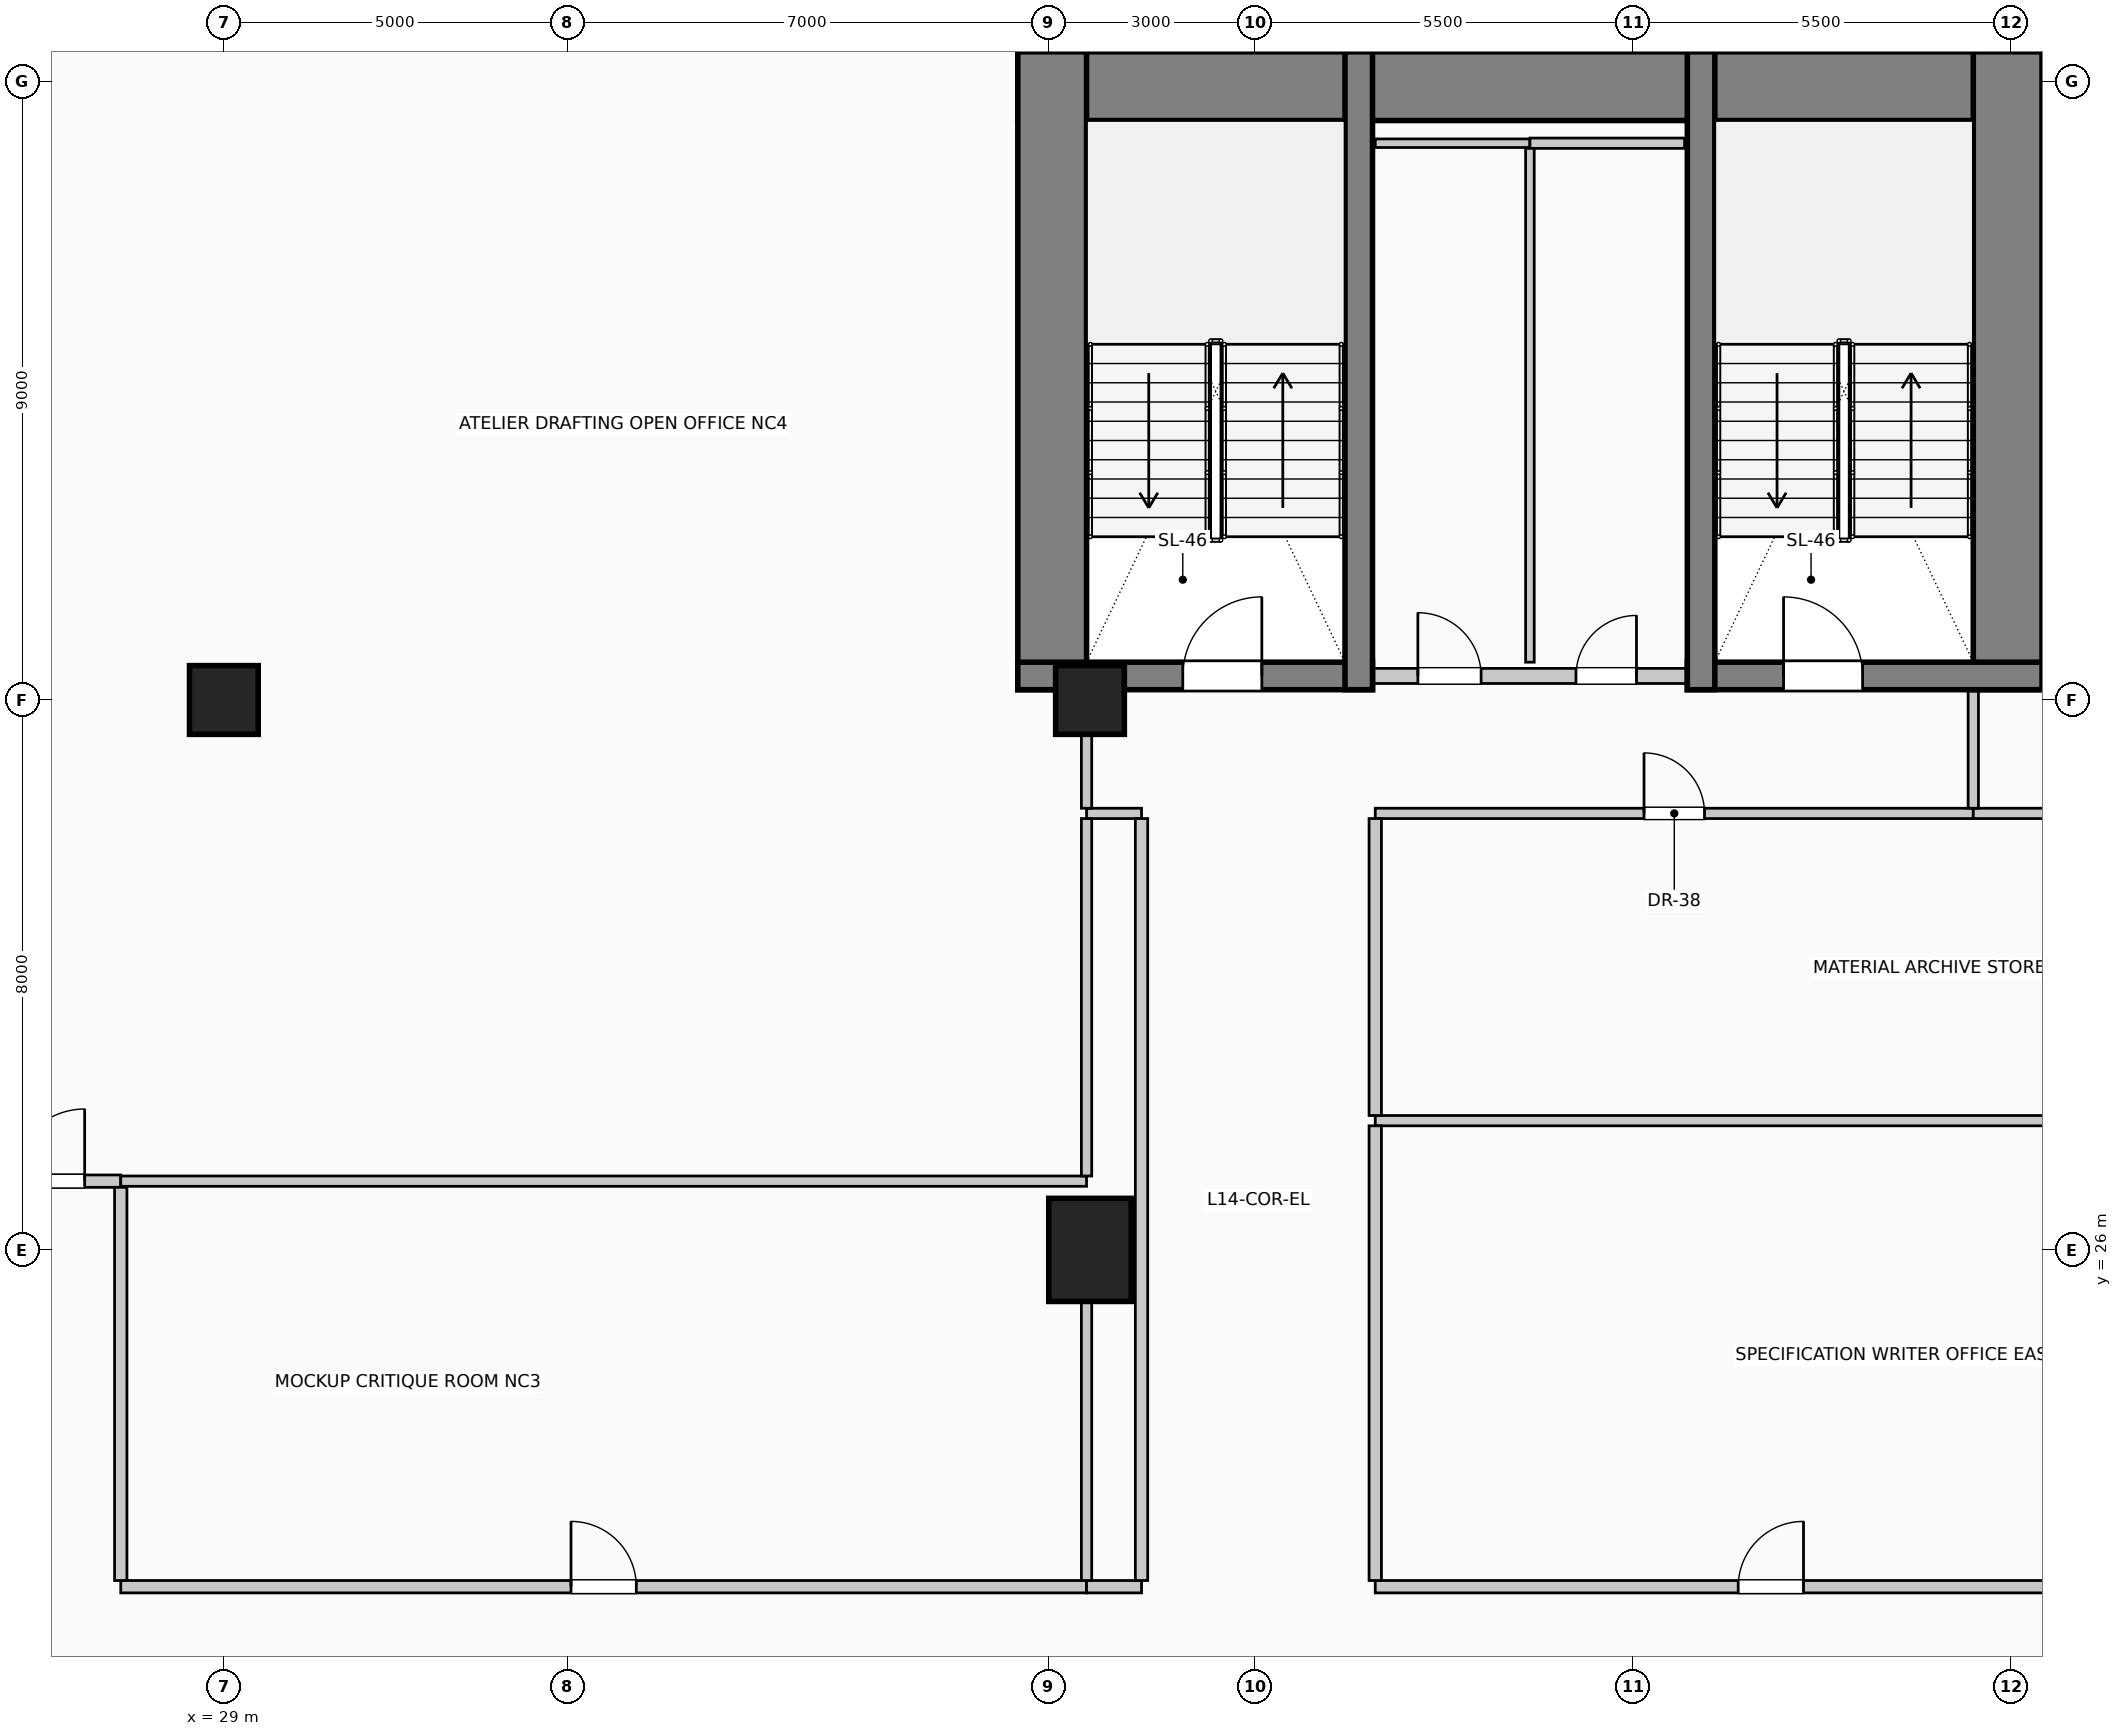
"""IFC4 building model, lengths in metres.
Left out: names, types, materials, properties, quantities, classifications, styles, units other than length and angle.
Written with IfcOpenShell. Run it as: python <this file> out.ifc"""

import sys

from ifc_helpers import new_model, si_unit, direction, frame, frame_2d, origin, origin_2d, place, context, subcontext, project, spatial, rectangle, circle, extrude, element, fill, save


model = new_model("IFC4")
c1 = context("Model", 3, precision=1e-05, world=origin(), true_north=direction((0.0, 1.0)))
c2 = subcontext(c1, "Body", "Model", "MODEL_VIEW")
j1 = project(units=[si_unit("LENGTHUNIT", "METRE"), si_unit("PLANEANGLEUNIT", "RADIAN")], contexts=[c1])
p1 = place(None, origin())
s1 = spatial("IfcSite", under=j1, at=p1, CompositionType="ELEMENT")
p2 = place(p1, origin())
s2 = spatial("IfcBuilding", under=s1, at=p2, CompositionType="ELEMENT")
p3 = place(p2, frame((0.0, 0.0, 58.6)))
s3 = spatial("IfcBuildingStorey", under=s2, at=p3, CompositionType="ELEMENT", Elevation=58.6)
p4 = place(p3, frame((40.55, 42.93, 0.0), z_axis=(0.0, 0.0, 1.0), x_axis=(1.0, 0.0, 0.0)))
e1 = element("IfcWall", 1, at=p4, inside=s3, PredefinedType="SHEAR", context=c2, shape_type="SweptSolid", body=[
    extrude(rectangle(XDim=14.9, YDim=1.0, at=frame_2d((7.45, 0.0))), origin(), (0.0, 0.0, 1.0), 4.0),
])
for number, where, z_axis, x_axis in (
    (2, (41.05, 34.15, 0.0), (0.0, 0.0, 1.0), (0.0, 1.0, 0.0)),
    (3, (54.95, 34.15, 0.0), (0.0, 0.0, 1.0), (0.0, 1.0, 0.0)),
):
    element("IfcWall", number, at=place(p3, frame(where, z_axis=z_axis, x_axis=x_axis)), inside=s3, PredefinedType="SHEAR", context=c2, shape_type="SweptSolid", body=[
        extrude(rectangle(XDim=9.28, YDim=1.0, at=frame_2d((4.64, 0.0))), origin(), (0.0, 0.0, 1.0), 4.0),
    ])
p5 = place(p3, frame((40.55, 34.35, 0.0), z_axis=(0.0, 0.0, 1.0), x_axis=(1.0, 0.0, 0.0)))
e4 = element("IfcWall", 4, at=p5, inside=s3, PredefinedType="SHEAR", context=c2, shape_type="SweptSolid", body=[
    extrude(rectangle(XDim=5.16, YDim=0.4, at=frame_2d((2.58, 0.0))), origin(), (0.0, 0.0, 1.0), 4.0),
])
p6 = place(p5, frame((2.4, 0.0, 0.0)))
e5 = element("IfcOpeningElement", 5, at=p6, cuts=e4, PredefinedType="OPENING", context=c2, shape_type="SweptSolid", body=[
    extrude(rectangle(XDim=1.15, YDim=2.2, at=frame_2d((0.575, 1.1))), frame((0.0, 0.21, 0.0), z_axis=(0.0, -1.0, 0.0), x_axis=(1.0, 0.0, 0.0)), (0.0, 0.0, 1.0), 0.42),
])
p7 = place(p3, frame((45.51, 34.15, 0.0), z_axis=(0.0, 0.0, 1.0), x_axis=(0.0, 1.0, 0.0)))
e6 = element("IfcWall", 6, at=p7, inside=s3, PredefinedType="SHEAR", context=c2, shape_type="SweptSolid", body=[
    extrude(rectangle(XDim=9.28, YDim=0.4, at=frame_2d((4.64, 0.0))), origin(), (0.0, 0.0, 1.0), 4.0),
])
p8 = place(p3, frame((50.29, 34.35, 0.0), z_axis=(0.0, 0.0, 1.0), x_axis=(1.0, 0.0, 0.0)))
e7 = element("IfcWall", 7, at=p8, inside=s3, PredefinedType="SHEAR", context=c2, shape_type="SweptSolid", body=[
    extrude(rectangle(XDim=5.16, YDim=0.4, at=frame_2d((2.58, 0.0))), origin(), (0.0, 0.0, 1.0), 4.0),
])
p9 = place(p8, frame((1.4, 0.0, 0.0)))
e8 = element("IfcOpeningElement", 8, at=p9, cuts=e7, PredefinedType="OPENING", context=c2, shape_type="SweptSolid", body=[
    extrude(rectangle(XDim=1.15, YDim=2.2, at=frame_2d((0.575, 1.1))), frame((0.0, 0.21, 0.0), z_axis=(0.0, -1.0, 0.0), x_axis=(1.0, 0.0, 0.0)), (0.0, 0.0, 1.0), 0.42),
])
p10 = place(p3, frame((50.49, 34.15, 0.0), z_axis=(0.0, 0.0, 1.0), x_axis=(0.0, 1.0, 0.0)))
e9 = element("IfcWall", 9, at=p10, inside=s3, PredefinedType="SHEAR", context=c2, shape_type="SweptSolid", body=[
    extrude(rectangle(XDim=9.28, YDim=0.4, at=frame_2d((4.64, 0.0))), origin(), (0.0, 0.0, 1.0), 4.0),
])
p11 = place(p3, frame((41.6, 26.0, 0.0), z_axis=(0.0, 0.0, 1.0), x_axis=(1.0, 0.0, 0.0)))
e10 = element("IfcColumn", 10, at=p11, inside=s3, PredefinedType="COLUMN", context=c2, shape_type="SweptSolid", body=[
    extrude(rectangle(XDim=1.2, YDim=1.5, at=origin_2d()), origin(), (0.0, 0.0, 1.0), 4.0),
])
for number, where, z_axis, x_axis in (
    (11, (29.0, 34.0, 0.0), (0.0, 0.0, 1.0), (1.0, 0.0, 0.0)),
    (12, (41.6, 34.0, 0.0), (0.0, 0.0, 1.0), (1.0, 0.0, 0.0)),
):
    element("IfcColumn", number, at=place(p3, frame(where, z_axis=z_axis, x_axis=x_axis)), inside=s3, PredefinedType="COLUMN", context=c2, shape_type="SweptSolid", body=[
        extrude(circle(Radius=0.5, at=origin_2d()), origin(), (0.0, 0.0, 1.0), 4.0),
    ])
p12 = place(p3, frame((45.72, 34.35, 0.0), z_axis=(0.0, 0.0, 1.0), x_axis=(1.0, 0.0, 0.0)))
e13 = element("IfcWall", 13, at=p12, inside=s3, PredefinedType="PARTITIONING", context=c2, shape_type="SweptSolid", body=[
    extrude(rectangle(XDim=4.56, YDim=0.22, at=frame_2d((2.28, 0.0))), origin(), (0.0, 0.0, 1.0), 3.7),
])
p13 = place(p12, frame((0.65, 0.0, 0.0)))
e14 = element("IfcOpeningElement", 14, at=p13, cuts=e13, PredefinedType="OPENING", context=c2, shape_type="SweptSolid", body=[
    extrude(rectangle(XDim=0.92, YDim=2.1, at=frame_2d((0.46, 1.05))), frame((0.0, 0.12, 0.0), z_axis=(0.0, -1.0, 0.0), x_axis=(1.0, 0.0, 0.0)), (0.0, 0.0, 1.0), 0.24),
])
p14 = place(p12, frame((2.95, 0.0, 0.0)))
e15 = element("IfcOpeningElement", 15, at=p14, cuts=e13, PredefinedType="OPENING", context=c2, shape_type="SweptSolid", body=[
    extrude(rectangle(XDim=0.88, YDim=2.1, at=frame_2d((0.44, 1.05))), frame((0.0, 0.12, 0.0), z_axis=(0.0, -1.0, 0.0), x_axis=(1.0, 0.0, 0.0)), (0.0, 0.0, 1.0), 0.24),
])
p15 = place(p3, frame((27.5, 21.1, 0.0), z_axis=(0.0, 0.0, 1.0), x_axis=(1.0, 0.0, 0.0)))
e16 = element("IfcWall", 16, at=p15, inside=s3, PredefinedType="PARTITIONING", context=c2, shape_type="SweptSolid", body=[
    extrude(rectangle(XDim=14.05, YDim=0.18, at=frame_2d((7.025, 0.0))), origin(), (0.0, 0.0, 1.0), 3.7),
])
p16 = place(p15, frame((6.55, 0.0, 0.0)))
e17 = element("IfcOpeningElement", 17, at=p16, cuts=e16, PredefinedType="OPENING", context=c2, shape_type="SweptSolid", body=[
    extrude(rectangle(XDim=0.95, YDim=2.15, at=frame_2d((0.475, 1.075))), frame((0.0, 0.1, 0.0), z_axis=(0.0, -1.0, 0.0), x_axis=(1.0, 0.0, 0.0)), (0.0, 0.0, 1.0), 0.2),
])
p17 = place(p3, frame((41.55, 21.1, 0.0), z_axis=(0.0, 0.0, 1.0), x_axis=(1.0, 0.0, 0.0)))
e18 = element("IfcWall", 18, at=p17, inside=s3, PredefinedType="PARTITIONING", context=c2, shape_type="SweptSolid", body=[
    extrude(rectangle(XDim=0.8, YDim=0.18, at=frame_2d((0.4, 0.0))), origin(), (0.0, 0.0, 1.0), 3.7),
])
p18 = place(p3, frame((45.75, 21.1, 0.0), z_axis=(0.0, 0.0, 1.0), x_axis=(1.0, 0.0, 0.0)))
e19 = element("IfcWall", 19, at=p18, inside=s3, PredefinedType="PARTITIONING", context=c2, shape_type="SweptSolid", body=[
    extrude(rectangle(XDim=11.51, YDim=0.18, at=frame_2d((5.755, 0.0))), origin(), (0.0, 0.0, 1.0), 3.7),
])
p19 = place(p18, frame((5.28, 0.0, 0.0)))
e20 = element("IfcOpeningElement", 20, at=p19, cuts=e19, PredefinedType="OPENING", context=c2, shape_type="SweptSolid", body=[
    extrude(rectangle(XDim=0.95, YDim=2.15, at=frame_2d((0.475, 1.075))), frame((0.0, 0.1, 0.0), z_axis=(0.0, -1.0, 0.0), x_axis=(1.0, 0.0, 0.0)), (0.0, 0.0, 1.0), 0.2),
])
p20 = place(p3, frame((25.4, 27.0, 0.0), z_axis=(0.0, 0.0, 1.0), x_axis=(1.0, 0.0, 0.0)))
e21 = element("IfcWall", 21, at=p20, inside=s3, PredefinedType="PARTITIONING", context=c2, shape_type="SweptSolid", body=[
    extrude(rectangle(XDim=2.1, YDim=0.18, at=frame_2d((1.05, 0.0))), origin(), (0.0, 0.0, 1.0), 3.7),
])
p21 = place(p20, frame((0.525, 0.0, 0.0)))
e22 = element("IfcOpeningElement", 22, at=p21, cuts=e21, PredefinedType="OPENING", context=c2, shape_type="SweptSolid", body=[
    extrude(rectangle(XDim=1.05, YDim=2.15, at=frame_2d((0.525, 1.075))), frame((0.0, 0.1, 0.0), z_axis=(0.0, -1.0, 0.0), x_axis=(1.0, 0.0, 0.0)), (0.0, 0.0, 1.0), 0.2),
])
p22 = place(p3, frame((27.5, 27.0, 0.0), z_axis=(0.0, 0.0, 1.0), x_axis=(1.0, 0.0, 0.0)))
e23 = element("IfcWall", 23, at=p22, inside=s3, PredefinedType="PARTITIONING", context=c2, shape_type="SweptSolid", body=[
    extrude(rectangle(XDim=14.05, YDim=0.15, at=frame_2d((7.025, 0.0))), origin(), (0.0, 0.0, 1.0), 3.7),
])
p23 = place(p3, frame((45.75, 27.88, 0.0), z_axis=(0.0, 0.0, 1.0), x_axis=(1.0, 0.0, 0.0)))
e24 = element("IfcWall", 24, at=p23, inside=s3, PredefinedType="PARTITIONING", context=c2, shape_type="SweptSolid", body=[
    extrude(rectangle(XDim=11.51, YDim=0.15, at=frame_2d((5.755, 0.0))), origin(), (0.0, 0.0, 1.0), 3.7),
])
p24 = place(p3, frame((41.55, 32.35, 0.0), z_axis=(0.0, 0.0, 1.0), x_axis=(1.0, 0.0, 0.0)))
e25 = element("IfcWall", 25, at=p24, inside=s3, PredefinedType="PARTITIONING", context=c2, shape_type="SweptSolid", body=[
    extrude(rectangle(XDim=0.8, YDim=0.15, at=frame_2d((0.4, 0.0))), origin(), (0.0, 0.0, 1.0), 3.7),
])
p25 = place(p3, frame((45.75, 32.35, 0.0), z_axis=(0.0, 0.0, 1.0), x_axis=(1.0, 0.0, 0.0)))
e26 = element("IfcWall", 26, at=p25, inside=s3, PredefinedType="PARTITIONING", context=c2, shape_type="SweptSolid", body=[
    extrude(rectangle(XDim=8.7, YDim=0.15, at=frame_2d((4.35, 0.0))), origin(), (0.0, 0.0, 1.0), 3.7),
])
p26 = place(p25, frame((3.91, 0.0, 0.0)))
e27 = element("IfcOpeningElement", 27, at=p26, cuts=e26, PredefinedType="OPENING", context=c2, shape_type="SweptSolid", body=[
    extrude(rectangle(XDim=0.88, YDim=2.1, at=frame_2d((0.44, 1.05))), frame((0.0, 0.085, 0.0), z_axis=(0.0, -1.0, 0.0), x_axis=(1.0, 0.0, 0.0)), (0.0, 0.0, 1.0), 0.17),
])
p27 = place(p3, frame((54.45, 32.35, 0.0), z_axis=(0.0, 0.0, 1.0), x_axis=(1.0, 0.0, 0.0)))
e28 = element("IfcWall", 28, at=p27, inside=s3, PredefinedType="PARTITIONING", context=c2, shape_type="SweptSolid", body=[
    extrude(rectangle(XDim=2.81, YDim=0.15, at=frame_2d((1.405, 0.0))), origin(), (0.0, 0.0, 1.0), 3.7),
])
p28 = place(p3, frame((45.75, 42.1, 0.0), z_axis=(0.0, 0.0, 1.0), x_axis=(1.0, 0.0, 0.0)))
e29 = element("IfcWall", 29, at=p28, inside=s3, PredefinedType="PARTITIONING", context=c2, shape_type="SweptSolid", body=[
    extrude(rectangle(XDim=2.25, YDim=0.125, at=frame_2d((1.125, 0.0))), origin(), (0.0, 0.0, 1.0), 3.7),
])
p29 = place(p3, frame((48.0, 42.1, 0.0), z_axis=(0.0, 0.0, 1.0), x_axis=(1.0, 0.0, 0.0)))
e30 = element("IfcWall", 30, at=p29, inside=s3, PredefinedType="PARTITIONING", context=c2, shape_type="SweptSolid", body=[
    extrude(rectangle(XDim=2.25, YDim=0.15, at=frame_2d((1.125, 0.0))), origin(), (0.0, 0.0, 1.0), 3.7),
])
p30 = place(p3, frame((27.5, 21.19, 0.0), z_axis=(0.0, 0.0, 1.0), x_axis=(0.0, 1.0, 0.0)))
e31 = element("IfcWall", 31, at=p30, inside=s3, PredefinedType="PARTITIONING", context=c2, shape_type="SweptSolid", body=[
    extrude(rectangle(XDim=5.72, YDim=0.18, at=frame_2d((2.86, 0.0))), origin(), (0.0, 0.0, 1.0), 3.7),
])
p31 = place(p3, frame((41.55, 21.19, 0.0), z_axis=(0.0, 0.0, 1.0), x_axis=(0.0, 1.0, 0.0)))
e32 = element("IfcWall", 32, at=p31, inside=s3, PredefinedType="PARTITIONING", context=c2, shape_type="SweptSolid", body=[
    extrude(rectangle(XDim=4.06, YDim=0.15, at=frame_2d((2.03, 0.0))), origin(), (0.0, 0.0, 1.0), 2.995),
])
p32 = place(p3, frame((41.55, 27.075, 0.0), z_axis=(0.0, 0.0, 1.0), x_axis=(0.0, 1.0, 0.0)))
e33 = element("IfcWall", 33, at=p32, inside=s3, PredefinedType="PARTITIONING", context=c2, shape_type="SweptSolid", body=[
    extrude(rectangle(XDim=5.2, YDim=0.15, at=frame_2d((2.6, 0.0))), origin(), (0.0, 0.0, 1.0), 2.995),
])
p33 = place(p3, frame((41.55, 32.425, 0.0), z_axis=(0.0, 0.0, 1.0), x_axis=(0.0, 1.0, 0.0)))
e34 = element("IfcWall", 34, at=p33, inside=s3, PredefinedType="PARTITIONING", context=c2, shape_type="SweptSolid", body=[
    extrude(rectangle(XDim=1.075, YDim=0.15, at=frame_2d((0.538, 0.0))), origin(), (0.0, 0.0, 1.0), 2.995),
])
p34 = place(p3, frame((41.55, 43.43, 0.0), z_axis=(0.0, 0.0, 1.0), x_axis=(0.0, 1.0, 0.0)))
e35 = element("IfcWall", 35, at=p34, inside=s3, PredefinedType="PARTITIONING", context=c2, shape_type="SweptSolid", body=[
    extrude(rectangle(XDim=1.22, YDim=0.15, at=frame_2d((0.61, 0.0))), origin(), (0.0, 0.0, 1.0), 3.7),
])
p35 = place(p3, frame((42.35, 21.19, 0.0), z_axis=(0.0, 0.0, 1.0), x_axis=(0.0, 1.0, 0.0)))
e36 = element("IfcWall", 36, at=p35, inside=s3, PredefinedType="PARTITIONING", context=c2, shape_type="SweptSolid", body=[
    extrude(rectangle(XDim=11.085, YDim=0.18, at=frame_2d((5.542, 0.0))), origin(), (0.0, 0.0, 1.0), 3.7),
])
p36 = place(p3, frame((45.75, 21.19, 0.0), z_axis=(0.0, 0.0, 1.0), x_axis=(0.0, 1.0, 0.0)))
e37 = element("IfcWall", 37, at=p36, inside=s3, PredefinedType="PARTITIONING", context=c2, shape_type="SweptSolid", body=[
    extrude(rectangle(XDim=6.615, YDim=0.18, at=frame_2d((3.308, 0.0))), origin(), (0.0, 0.0, 1.0), 3.7),
])
p37 = place(p3, frame((45.75, 27.955, 0.0), z_axis=(0.0, 0.0, 1.0), x_axis=(0.0, 1.0, 0.0)))
e38 = element("IfcWall", 38, at=p37, inside=s3, PredefinedType="PARTITIONING", context=c2, shape_type="SweptSolid", body=[
    extrude(rectangle(XDim=4.32, YDim=0.18, at=frame_2d((2.16, 0.0))), origin(), (0.0, 0.0, 1.0), 3.7),
])
p38 = place(p3, frame((48.0, 34.55, 0.0), z_axis=(0.0, 0.0, 1.0), x_axis=(0.0, 1.0, 0.0)))
e39 = element("IfcWall", 39, at=p38, inside=s3, PredefinedType="PARTITIONING", context=c2, shape_type="SweptSolid", body=[
    extrude(rectangle(XDim=7.475, YDim=0.125, at=frame_2d((3.737, 0.0))), origin(), (0.0, 0.0, 1.0), 3.7),
])
p39 = place(p3, frame((54.45, 32.425, 0.0), z_axis=(0.0, 0.0, 1.0), x_axis=(0.0, 1.0, 0.0)))
e40 = element("IfcWall", 40, at=p39, inside=s3, PredefinedType="PARTITIONING", context=c2, shape_type="SweptSolid", body=[
    extrude(rectangle(XDim=1.725, YDim=0.15, at=frame_2d((0.862, 0.0))), origin(), (0.0, 0.0, 1.0), 3.7),
])
p40 = place(p6, origin())
e41 = element("IfcDoor", 41, at=p40, inside=s3, OperationType="SINGLE_SWING_RIGHT", PredefinedType="DOOR", context=c2, shape_type="SweptSolid", body=[
    extrude(rectangle(XDim=1.15, YDim=2.2, at=frame_2d((0.575, 1.1))), frame((0.0, 0.025, 0.0), z_axis=(0.0, -1.0, 0.0), x_axis=(1.0, 0.0, 0.0)), (0.0, 0.0, 1.0), 0.05),
])
fill(e5, e41)
p41 = place(p13, origin())
e42 = element("IfcDoor", 42, at=p41, inside=s3, OperationType="SINGLE_SWING_LEFT", PredefinedType="DOOR", context=c2, shape_type="SweptSolid", body=[
    extrude(rectangle(XDim=0.92, YDim=2.1, at=frame_2d((0.46, 1.05))), frame((0.0, 0.025, 0.0), z_axis=(0.0, -1.0, 0.0), x_axis=(1.0, 0.0, 0.0)), (0.0, 0.0, 1.0), 0.05),
])
fill(e14, e42)
p42 = place(p14, origin())
e43 = element("IfcDoor", 43, at=p42, inside=s3, OperationType="SINGLE_SWING_RIGHT", PredefinedType="DOOR", context=c2, shape_type="SweptSolid", body=[
    extrude(rectangle(XDim=0.88, YDim=2.1, at=frame_2d((0.44, 1.05))), frame((0.0, 0.025, 0.0), z_axis=(0.0, -1.0, 0.0), x_axis=(1.0, 0.0, 0.0)), (0.0, 0.0, 1.0), 0.05),
])
fill(e15, e43)
p43 = place(p9, origin())
e44 = element("IfcDoor", 44, at=p43, inside=s3, OperationType="SINGLE_SWING_LEFT", PredefinedType="DOOR", context=c2, shape_type="SweptSolid", body=[
    extrude(rectangle(XDim=1.15, YDim=2.2, at=frame_2d((0.575, 1.1))), frame((0.0, 0.025, 0.0), z_axis=(0.0, -1.0, 0.0), x_axis=(1.0, 0.0, 0.0)), (0.0, 0.0, 1.0), 0.05),
])
fill(e8, e44)
p44 = place(p16, origin())
e45 = element("IfcDoor", 45, at=p44, inside=s3, OperationType="SINGLE_SWING_LEFT", PredefinedType="DOOR", context=c2, shape_type="SweptSolid", body=[
    extrude(rectangle(XDim=0.95, YDim=2.15, at=frame_2d((0.475, 1.075))), frame((0.0, 0.025, 0.0), z_axis=(0.0, -1.0, 0.0), x_axis=(1.0, 0.0, 0.0)), (0.0, 0.0, 1.0), 0.05),
])
fill(e17, e45)
p45 = place(p19, origin())
e46 = element("IfcDoor", 46, at=p45, inside=s3, OperationType="SINGLE_SWING_RIGHT", PredefinedType="DOOR", context=c2, shape_type="SweptSolid", body=[
    extrude(rectangle(XDim=0.95, YDim=2.15, at=frame_2d((0.475, 1.075))), frame((0.0, 0.025, 0.0), z_axis=(0.0, -1.0, 0.0), x_axis=(1.0, 0.0, 0.0)), (0.0, 0.0, 1.0), 0.05),
])
fill(e20, e46)
p46 = place(p21, origin())
e47 = element("IfcDoor", 47, at=p46, inside=s3, OperationType="SINGLE_SWING_RIGHT", PredefinedType="DOOR", context=c2, shape_type="SweptSolid", body=[
    extrude(rectangle(XDim=1.05, YDim=2.15, at=frame_2d((0.525, 1.075))), frame((0.0, 0.025, 0.0), z_axis=(0.0, -1.0, 0.0), x_axis=(1.0, 0.0, 0.0)), (0.0, 0.0, 1.0), 0.05),
])
fill(e22, e47)
p47 = place(p26, origin())
e48 = element("IfcDoor", 48, at=p47, inside=s3, OperationType="SINGLE_SWING_LEFT", PredefinedType="DOOR", context=c2, shape_type="SweptSolid", body=[
    extrude(rectangle(XDim=0.88, YDim=2.1, at=frame_2d((0.44, 1.05))), frame((0.0, 0.025, 0.0), z_axis=(0.0, -1.0, 0.0), x_axis=(1.0, 0.0, 0.0)), (0.0, 0.0, 1.0), 0.05),
])
fill(e27, e48)
save(model, sys.argv[1])
